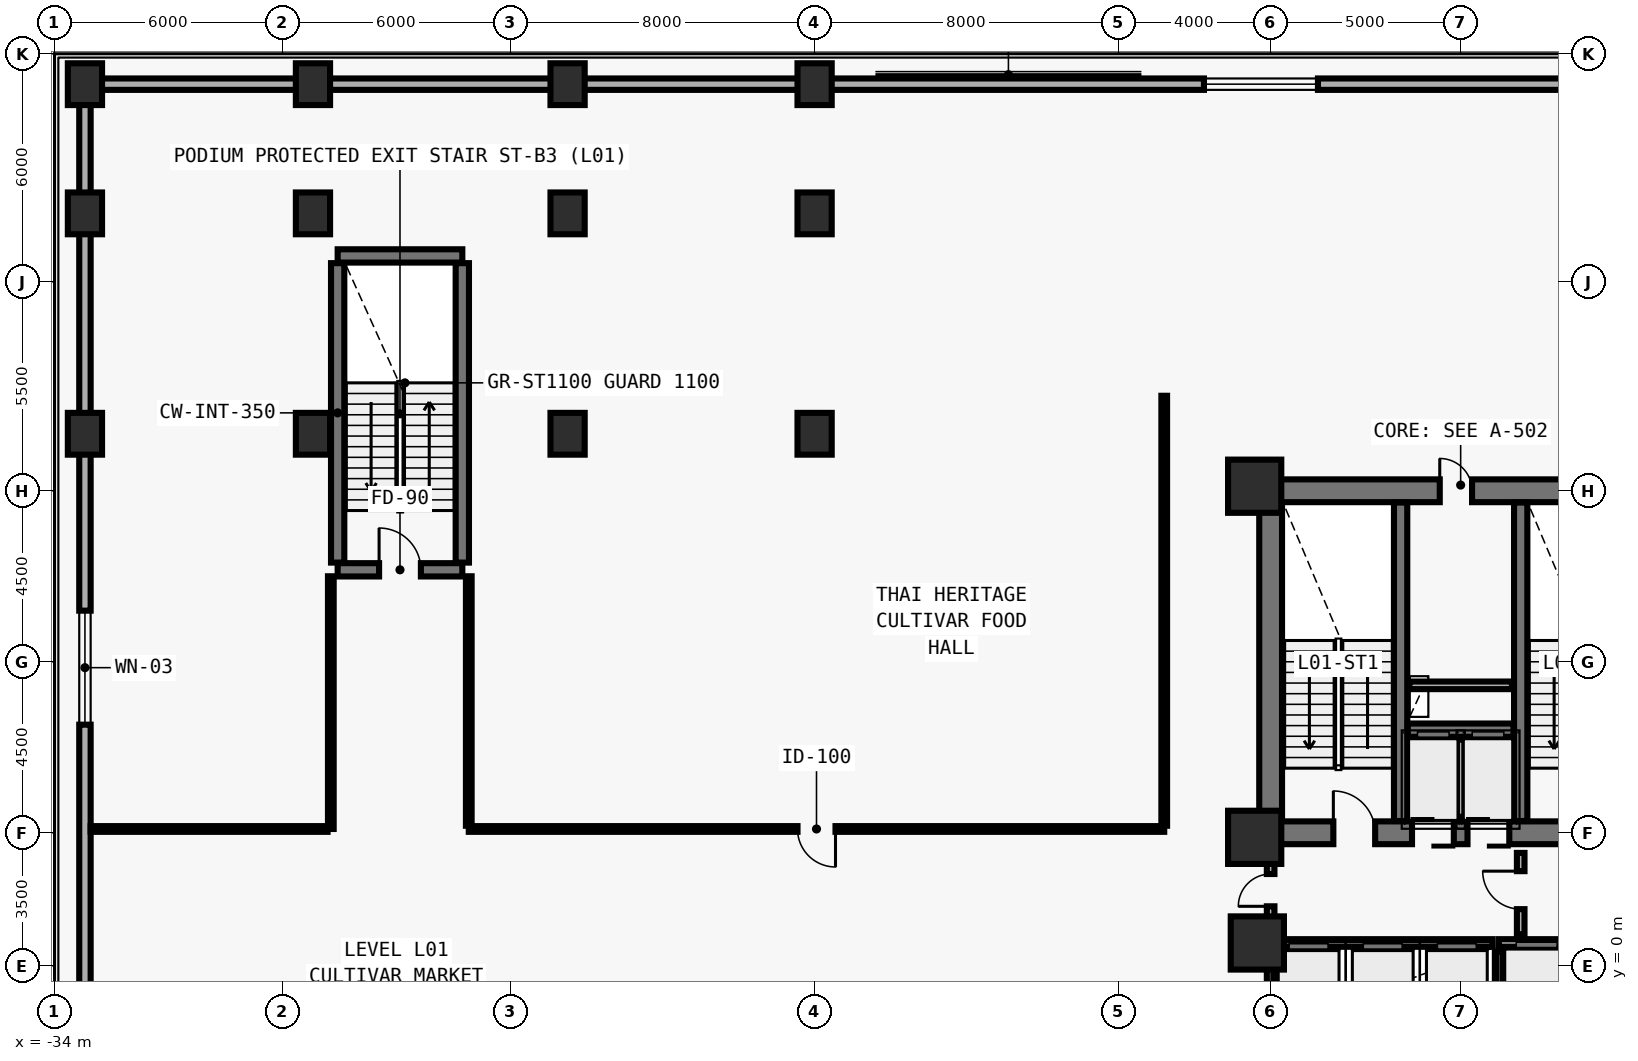
"""IFC4 building model, lengths in metres.
Left out: names, types, materials, properties, quantities, classifications, styles, units other than length and angle.
Written with IfcOpenShell. Run it as: python <this file> out.ifc"""

import sys

from ifc_helpers import new_model, si_unit, direction, frame, frame_2d, origin, origin_2d, place, context, subcontext, project, spatial, rectangle, extrude, element, fill, save


model = new_model("IFC4")
c1 = context("Model", 3, precision=1e-05, world=origin(), true_north=direction((0.0, 1.0)))
c2 = subcontext(c1, "Body", "Model", "MODEL_VIEW")
j1 = project(units=[si_unit("LENGTHUNIT", "METRE"), si_unit("PLANEANGLEUNIT", "RADIAN")], contexts=[c1])
p1 = place(None, origin())
s1 = spatial("IfcSite", under=j1, at=p1, CompositionType="ELEMENT")
p2 = place(p1, origin())
s2 = spatial("IfcBuilding", under=s1, at=p2, CompositionType="ELEMENT")
p3 = place(p2, frame((0.0, 0.0, 4.6)))
s3 = spatial("IfcBuildingStorey", under=s2, at=p3, CompositionType="ELEMENT", Elevation=4.6)
p4 = place(p3, frame((-26.55, 10.42, 0.0), z_axis=(0.0, 0.0, 1.0), x_axis=(1.0, 0.0, 0.0)))
e1 = element("IfcWall", 1, at=p4, inside=s3, PredefinedType="SHEAR", context=c2, shape_type="SweptSolid", body=[
    extrude(rectangle(XDim=3.28, YDim=0.35, at=frame_2d((1.64, 0.0))), origin(), (0.0, 0.0, 1.0), 4.592),
])
p5 = place(p4, frame((1.09, 0.0, 0.0)))
e2 = element("IfcOpeningElement", 2, at=p5, cuts=e1, PredefinedType="OPENING", context=c2, shape_type="SweptSolid", body=[
    extrude(rectangle(XDim=1.1, YDim=2.15, at=frame_2d((0.55, 1.075))), frame((0.0, 0.185, 0.0), z_axis=(0.0, -1.0, 0.0), x_axis=(1.0, 0.0, 0.0)), (0.0, 0.0, 1.0), 0.37),
])
p6 = place(p3, frame((-26.55, 18.68, 0.0), z_axis=(0.0, 0.0, 1.0), x_axis=(1.0, 0.0, 0.0)))
e3 = element("IfcWall", 3, at=p6, inside=s3, PredefinedType="SHEAR", context=c2, shape_type="SweptSolid", body=[
    extrude(rectangle(XDim=3.28, YDim=0.35, at=frame_2d((1.64, 0.0))), origin(), (0.0, 0.0, 1.0), 4.592),
])
for number, where, z_axis, x_axis in (
    (4, (-26.55, 10.61, 0.0), (0.0, 0.0, 1.0), (0.0, 1.0, 0.0)),
    (5, (-23.27, 10.61, 0.0), (0.0, 0.0, 1.0), (0.0, 1.0, 0.0)),
):
    element("IfcWall", number, at=place(p3, frame(where, z_axis=z_axis, x_axis=x_axis)), inside=s3, PredefinedType="SHEAR", context=c2, shape_type="SweptSolid", body=[
        extrude(rectangle(XDim=7.88, YDim=0.35, at=frame_2d((3.94, 0.0))), origin(), (0.0, 0.0, 1.0), 4.592),
    ])
p7 = place(p3, frame((-2.0, 3.5, 0.0), z_axis=(0.0, 0.0, 1.0), x_axis=(1.0, 0.0, 0.0)))
e6 = element("IfcWall", 6, at=p7, inside=s3, PredefinedType="SHEAR", context=c2, shape_type="SweptSolid", body=[
    extrude(rectangle(XDim=10.0, YDim=0.6, at=frame_2d((5.0, 0.0))), origin(), (0.0, 0.0, 1.0), 4.592),
])
p8 = place(p7, frame((1.65, 0.0, 0.0)))
e7 = element("IfcOpeningElement", 7, at=p8, cuts=e6, PredefinedType="OPENING", context=c2, shape_type="SweptSolid", body=[
    extrude(rectangle(XDim=1.1, YDim=2.15, at=frame_2d((0.55, 1.075))), frame((0.0, 0.31, 0.0), z_axis=(0.0, -1.0, 0.0), x_axis=(1.0, 0.0, 0.0)), (0.0, 0.0, 1.0), 0.62),
])
p9 = place(p7, frame((7.65, 0.0, 0.0)))
e8 = element("IfcOpeningElement", 8, at=p9, cuts=e6, PredefinedType="OPENING", context=c2, shape_type="SweptSolid", body=[
    extrude(rectangle(XDim=1.1, YDim=2.15, at=frame_2d((0.55, 1.075))), frame((0.0, 0.31, 0.0), z_axis=(0.0, -1.0, 0.0), x_axis=(1.0, 0.0, 0.0)), (0.0, 0.0, 1.0), 0.62),
])
p10 = place(p7, frame((3.72, 0.0, 0.0)))
e9 = element("IfcOpeningElement", 9, at=p10, cuts=e6, PredefinedType="OPENING", context=c2, shape_type="SweptSolid", body=[
    extrude(rectangle(XDim=1.1, YDim=2.2, at=frame_2d((0.55, 1.1))), frame((0.0, 0.31, 0.0), z_axis=(0.0, -1.0, 0.0), x_axis=(1.0, 0.0, 0.0)), (0.0, 0.0, 1.0), 0.62),
])
p11 = place(p7, frame((5.18, 0.0, 0.0)))
e10 = element("IfcOpeningElement", 10, at=p11, cuts=e6, PredefinedType="OPENING", context=c2, shape_type="SweptSolid", body=[
    extrude(rectangle(XDim=1.1, YDim=2.2, at=frame_2d((0.55, 1.1))), frame((0.0, 0.31, 0.0), z_axis=(0.0, -1.0, 0.0), x_axis=(1.0, 0.0, 0.0)), (0.0, 0.0, 1.0), 0.62),
])
p12 = place(p3, frame((-2.0, 12.5, 0.0), z_axis=(0.0, 0.0, 1.0), x_axis=(1.0, 0.0, 0.0)))
e11 = element("IfcWall", 11, at=p12, inside=s3, PredefinedType="SHEAR", context=c2, shape_type="SweptSolid", body=[
    extrude(rectangle(XDim=10.0, YDim=0.6, at=frame_2d((5.0, 0.0))), origin(), (0.0, 0.0, 1.0), 4.592),
])
p13 = place(p12, frame((4.45, 0.0, 0.0)))
e12 = element("IfcOpeningElement", 12, at=p13, cuts=e11, PredefinedType="OPENING", context=c2, shape_type="SweptSolid", body=[
    extrude(rectangle(XDim=0.85, YDim=2.1, at=frame_2d((0.425, 1.05))), frame((0.0, 0.31, 0.0), z_axis=(0.0, -1.0, 0.0), x_axis=(1.0, 0.0, 0.0)), (0.0, 0.0, 1.0), 0.62),
])
p14 = place(p3, frame((-2.0, 3.81, 0.0), z_axis=(0.0, 0.0, 1.0), x_axis=(0.0, 1.0, 0.0)))
e13 = element("IfcWall", 13, at=p14, inside=s3, PredefinedType="SHEAR", context=c2, shape_type="SweptSolid", body=[
    extrude(rectangle(XDim=8.38, YDim=0.6, at=frame_2d((4.19, 0.0))), origin(), (0.0, 0.0, 1.0), 4.592),
])
for number, where, z_axis, x_axis in (
    (14, (1.42, 3.81, 0.0), (0.0, 0.0, 1.0), (0.0, 1.0, 0.0)),
    (15, (4.58, 3.81, 0.0), (0.0, 0.0, 1.0), (0.0, 1.0, 0.0)),
):
    element("IfcWall", number, at=place(p3, frame(where, z_axis=z_axis, x_axis=x_axis)), inside=s3, PredefinedType="SHEAR", context=c2, shape_type="SweptSolid", body=[
        extrude(rectangle(XDim=8.38, YDim=0.35, at=frame_2d((4.19, 0.0))), origin(), (0.0, 0.0, 1.0), 4.592),
    ])
p15 = place(p3, frame((1.61, 6.2, 0.0), z_axis=(0.0, 0.0, 1.0), x_axis=(1.0, 0.0, 0.0)))
e16 = element("IfcWall", 16, at=p15, inside=s3, PredefinedType="SHEAR", context=c2, shape_type="SweptSolid", body=[
    extrude(rectangle(XDim=2.78, YDim=0.35, at=frame_2d((1.39, 0.0))), origin(), (0.0, 0.0, 1.0), 4.592),
])
for number, where, z_axis, x_axis in (
    (17, (-2.42, 12.62, 0.0), (0.0, 0.0, 1.0), (1.0, 0.0, 0.0)),
    (18, (-2.42, 3.38, 0.0), (0.0, 0.0, 1.0), (1.0, 0.0, 0.0)),
    (19, (-2.35, 0.6, 0.0), (0.0, 0.0, 1.0), (1.0, 0.0, 0.0)),
):
    element("IfcColumn", number, at=place(p3, frame(where, z_axis=z_axis, x_axis=x_axis)), inside=s3, PredefinedType="COLUMN", context=c2, shape_type="SweptSolid", body=[
        extrude(rectangle(XDim=1.4, YDim=1.4, at=origin_2d()), origin(), (0.0, 0.0, 1.0), 4.575),
    ])
for number, where, z_axis, x_axis in (
    (20, (-33.2, 14.0, 0.0), (0.0, 0.0, 1.0), (1.0, 0.0, 0.0)),
    (21, (-33.2, 19.8, 0.0), (0.0, 0.0, 1.0), (1.0, 0.0, 0.0)),
    (22, (-33.2, 23.2, 0.0), (0.0, 0.0, 1.0), (1.0, 0.0, 0.0)),
    (23, (-27.2, 14.0, 0.0), (0.0, 0.0, 1.0), (1.0, 0.0, 0.0)),
    (24, (-27.2, 19.8, 0.0), (0.0, 0.0, 1.0), (1.0, 0.0, 0.0)),
    (25, (-27.2, 23.2, 0.0), (0.0, 0.0, 1.0), (1.0, 0.0, 0.0)),
    (26, (-20.5, 14.0, 0.0), (0.0, 0.0, 1.0), (1.0, 0.0, 0.0)),
    (27, (-20.5, 19.8, 0.0), (0.0, 0.0, 1.0), (1.0, 0.0, 0.0)),
    (28, (-20.5, 23.2, 0.0), (0.0, 0.0, 1.0), (1.0, 0.0, 0.0)),
    (29, (-14.0, 14.0, 0.0), (0.0, 0.0, 1.0), (1.0, 0.0, 0.0)),
    (30, (-14.0, 19.8, 0.0), (0.0, 0.0, 1.0), (1.0, 0.0, 0.0)),
    (31, (-14.0, 23.2, 0.0), (0.0, 0.0, 1.0), (1.0, 0.0, 0.0)),
):
    element("IfcColumn", number, at=place(p3, frame(where, z_axis=z_axis, x_axis=x_axis)), inside=s3, PredefinedType="COLUMN", context=c2, shape_type="SweptSolid", body=[
        extrude(rectangle(XDim=0.9, YDim=1.1, at=origin_2d()), origin(), (0.0, 0.0, 1.0), 4.575),
    ])
p16 = place(p3, frame((-33.2, -22.655, 0.0), z_axis=(0.0, 0.0, 1.0), x_axis=(0.0, 1.0, 0.0)))
e32 = element("IfcWall", 32, at=p16, inside=s3, PredefinedType="SOLIDWALL", context=c2, shape_type="SweptSolid", body=[
    extrude(rectangle(XDim=45.31, YDim=0.3, at=frame_2d((22.655, 0.0))), origin(), (0.0, 0.0, 1.0), 3.35),
])
p17 = place(p16, frame((29.0, 0.0, 0.85)))
e33 = element("IfcOpeningElement", 33, at=p17, cuts=e32, PredefinedType="OPENING", context=c2, shape_type="SweptSolid", body=[
    extrude(rectangle(XDim=3.0, YDim=2.1, at=frame_2d((1.5, 1.05))), frame((0.0, 0.16, 0.0), z_axis=(0.0, -1.0, 0.0), x_axis=(1.0, 0.0, 0.0)), (0.0, 0.0, 1.0), 0.32),
])
p18 = place(p3, frame((-32.755, 23.2, 0.0), z_axis=(0.0, 0.0, 1.0), x_axis=(1.0, 0.0, 0.0)))
e34 = element("IfcWall", 34, at=p18, inside=s3, PredefinedType="SOLIDWALL", context=c2, shape_type="SweptSolid", body=[
    extrude(rectangle(XDim=65.51, YDim=0.3, at=frame_2d((32.755, 0.0))), origin(), (0.0, 0.0, 1.0), 3.35),
])
p19 = place(p18, frame((29.0, 0.0, 0.85)))
e35 = element("IfcOpeningElement", 35, at=p19, cuts=e34, PredefinedType="OPENING", context=c2, shape_type="SweptSolid", body=[
    extrude(rectangle(XDim=3.0, YDim=2.1, at=frame_2d((1.5, 1.05))), frame((0.0, 0.16, 0.0), z_axis=(0.0, -1.0, 0.0), x_axis=(1.0, 0.0, 0.0)), (0.0, 0.0, 1.0), 0.32),
])
p20 = place(p3, frame((3.0, 3.92, 0.0), z_axis=(0.0, 0.0, 1.0), x_axis=(0.0, 1.0, 0.0)))
e36 = element("IfcWall", 36, at=p20, inside=s3, PredefinedType="SOLIDWALL", context=c2, shape_type="SweptSolid", body=[
    extrude(rectangle(XDim=2.03, YDim=0.2, at=frame_2d((1.015, 0.0))), origin(), (0.0, 0.0, 1.0), 4.28),
])
p21 = place(p3, frame((1.65, 7.38, 0.0), z_axis=(0.0, 0.0, 1.0), x_axis=(1.0, 0.0, 0.0)))
e37 = element("IfcWall", 37, at=p21, inside=s3, PredefinedType="SOLIDWALL", context=c2, shape_type="SweptSolid", body=[
    extrude(rectangle(XDim=2.7, YDim=0.2, at=frame_2d((1.35, 0.0))), origin(), (0.0, 0.0, 1.0), 4.28),
])
p22 = place(p3, frame((4.0, 0.6, 0.0), z_axis=(0.0, 0.0, 1.0), x_axis=(1.0, 0.0, 0.0)))
e38 = element("IfcWall", 38, at=p22, inside=s3, PredefinedType="SOLIDWALL", context=c2, shape_type="SweptSolid", body=[
    extrude(rectangle(XDim=3.88, YDim=0.2, at=frame_2d((1.94, 0.0))), origin(), (0.0, 0.0, 1.0), 3.362),
])
p23 = place(p3, frame((-2.0, -1.57, 0.0), z_axis=(0.0, 0.0, 1.0), x_axis=(0.0, 1.0, 0.0)))
e39 = element("IfcWall", 39, at=p23, inside=s3, PredefinedType="SOLIDWALL", context=c2, shape_type="SweptSolid", body=[
    extrude(rectangle(XDim=2.05, YDim=0.2, at=frame_2d((1.025, 0.0))), origin(), (0.0, 0.0, 1.0), 3.362),
])
p24 = place(p3, frame((4.0, -1.57, 0.0), z_axis=(0.0, 0.0, 1.0), x_axis=(0.0, 1.0, 0.0)))
e40 = element("IfcWall", 40, at=p24, inside=s3, PredefinedType="SOLIDWALL", context=c2, shape_type="SweptSolid", body=[
    extrude(rectangle(XDim=1.94, YDim=0.2, at=frame_2d((0.97, 0.0))), origin(), (0.0, 0.0, 1.0), 4.28),
])
p25 = place(p3, frame((4.58, 0.83, 0.0), z_axis=(0.0, 0.0, 1.0), x_axis=(0.0, 1.0, 0.0)))
e41 = element("IfcWall", 41, at=p25, inside=s3, PredefinedType="MOVABLE", context=c2, shape_type="SweptSolid", body=[
    extrude(rectangle(XDim=2.14, YDim=0.2, at=frame_2d((1.07, 0.0))), origin(), (0.0, 0.0, 1.0), 4.28),
])
p26 = place(p25, frame((0.66, 0.0, 0.0)))
e42 = element("IfcOpeningElement", 42, at=p26, cuts=e41, PredefinedType="OPENING", context=c2, shape_type="SweptSolid", body=[
    extrude(rectangle(XDim=1.0, YDim=2.1, at=frame_2d((0.5, 1.05))), frame((0.0, 0.11, 0.0), z_axis=(0.0, -1.0, 0.0), x_axis=(1.0, 0.0, 0.0)), (0.0, 0.0, 1.0), 0.22),
])
p27 = place(p3, frame((-2.0, 0.72, 0.0), z_axis=(0.0, 0.0, 1.0), x_axis=(0.0, 1.0, 0.0)))
e43 = element("IfcWall", 43, at=p27, inside=s3, PredefinedType="MOVABLE", context=c2, shape_type="SweptSolid", body=[
    extrude(rectangle(XDim=2.25, YDim=0.2, at=frame_2d((1.125, 0.0))), origin(), (0.0, 0.0, 1.0), 3.512),
])
p28 = place(p27, frame((0.845, 0.0, 0.0)))
e44 = element("IfcOpeningElement", 44, at=p28, cuts=e43, PredefinedType="OPENING", context=c2, shape_type="SweptSolid", body=[
    extrude(rectangle(XDim=0.85, YDim=2.1, at=frame_2d((0.425, 1.05))), frame((0.0, 0.11, 0.0), z_axis=(0.0, -1.0, 0.0), x_axis=(1.0, 0.0, 0.0)), (0.0, 0.0, 1.0), 0.22),
])
p29 = place(p3, frame((-4.8, 3.6, 0.0), z_axis=(0.0, 0.0, 1.0), x_axis=(-1.0, 0.0, 0.0)))
e45 = element("IfcWall", 45, at=p29, inside=s3, PredefinedType="PARTITIONING", context=c2, shape_type="SweptSolid", body=[
    extrude(rectangle(XDim=18.3, YDim=0.15, at=frame_2d((9.15, 0.0))), origin(), (0.0, 0.0, 1.0), 4.28),
])
p30 = place(p29, frame((8.65, 0.0, 0.0)))
e46 = element("IfcOpeningElement", 46, at=p30, cuts=e45, PredefinedType="OPENING", context=c2, shape_type="SweptSolid", body=[
    extrude(rectangle(XDim=1.0, YDim=2.1, at=frame_2d((0.5, 1.05))), frame((0.0, 0.085, 0.0), z_axis=(0.0, -1.0, 0.0), x_axis=(1.0, 0.0, 0.0)), (0.0, 0.0, 1.0), 0.17),
])
p31 = place(p3, frame((-1.88, 0.6, 0.0), z_axis=(0.0, 0.0, 1.0), x_axis=(1.0, 0.0, 0.0)))
e47 = element("IfcWall", 47, at=p31, inside=s3, PredefinedType="MOVABLE", context=c2, shape_type="SweptSolid", body=[
    extrude(rectangle(XDim=5.72, YDim=0.2, at=frame_2d((2.86, 0.0))), origin(), (0.0, 0.0, 1.0), 3.362),
])
p32 = place(p3, frame((-4.8, 15.0, 0.0), z_axis=(0.0, 0.0, 1.0), x_axis=(0.0, -1.0, 0.0)))
e48 = element("IfcWall", 48, at=p32, inside=s3, PredefinedType="PARTITIONING", context=c2, shape_type="SweptSolid", body=[
    extrude(rectangle(XDim=11.315, YDim=0.15, at=frame_2d((5.657, 0.0))), origin(), (0.0, 0.0, 1.0), 4.28),
])
p33 = place(p3, frame((-23.1, 3.685, 0.0), z_axis=(0.0, 0.0, 1.0), x_axis=(0.0, 1.0, 0.0)))
e49 = element("IfcWall", 49, at=p33, inside=s3, PredefinedType="PARTITIONING", context=c2, shape_type="SweptSolid", body=[
    extrude(rectangle(XDim=6.565, YDim=0.15, at=frame_2d((3.282, 0.0))), origin(), (0.0, 0.0, 1.0), 4.28),
])
p34 = place(p3, frame((-26.73, 10.25, 0.0), z_axis=(0.0, 0.0, 1.0), x_axis=(0.0, -1.0, 0.0)))
e50 = element("IfcWall", 50, at=p34, inside=s3, PredefinedType="PARTITIONING", context=c2, shape_type="SweptSolid", body=[
    extrude(rectangle(XDim=6.65, YDim=0.15, at=frame_2d((3.325, 0.0))), origin(), (0.0, 0.0, 1.0), 4.28),
])
p35 = place(p3, frame((-26.815, 3.6, 0.0), z_axis=(0.0, 0.0, 1.0), x_axis=(-1.0, 0.0, 0.0)))
e51 = element("IfcWall", 51, at=p35, inside=s3, PredefinedType="PARTITIONING", context=c2, shape_type="SweptSolid", body=[
    extrude(rectangle(XDim=6.235, YDim=0.15, at=frame_2d((3.118, 0.0))), origin(), (0.0, 0.0, 1.0), 4.28),
])
p36 = place(p17, origin())
e52 = element("IfcWindow", 52, at=p36, inside=s3, PartitioningType="SINGLE_PANEL", PredefinedType="WINDOW", context=c2, shape_type="SweptSolid", body=[
    extrude(rectangle(XDim=3.0, YDim=2.1, at=frame_2d((1.5, 1.05))), frame((0.0, 0.03, 0.0), z_axis=(0.0, -1.0, 0.0), x_axis=(1.0, 0.0, 0.0)), (0.0, 0.0, 1.0), 0.06),
])
fill(e33, e52)
p37 = place(p19, origin())
e53 = element("IfcWindow", 53, at=p37, inside=s3, PartitioningType="SINGLE_PANEL", PredefinedType="WINDOW", context=c2, shape_type="SweptSolid", body=[
    extrude(rectangle(XDim=3.0, YDim=2.1, at=frame_2d((1.5, 1.05))), frame((0.0, 0.03, 0.0), z_axis=(0.0, -1.0, 0.0), x_axis=(1.0, 0.0, 0.0)), (0.0, 0.0, 1.0), 0.06),
])
fill(e35, e53)
p38 = place(p8, origin())
e54 = element("IfcDoor", 54, at=p38, inside=s3, OperationType="SINGLE_SWING_LEFT", PredefinedType="DOOR", context=c2, shape_type="SweptSolid", body=[
    extrude(rectangle(XDim=1.1, YDim=2.15, at=frame_2d((0.55, 1.075))), frame((0.0, 0.025, 0.0), z_axis=(0.0, -1.0, 0.0), x_axis=(1.0, 0.0, 0.0)), (0.0, 0.0, 1.0), 0.05),
])
fill(e7, e54)
p39 = place(p10, origin())
e55 = element("IfcDoor", 55, at=p39, inside=s3, OperationType="DOUBLE_DOOR_SLIDING", PredefinedType="DOOR", context=c2, shape_type="SweptSolid", body=[
    extrude(rectangle(XDim=1.1, YDim=2.2, at=frame_2d((0.55, 1.1))), frame((0.0, 0.025, 0.0), z_axis=(0.0, -1.0, 0.0), x_axis=(1.0, 0.0, 0.0)), (0.0, 0.0, 1.0), 0.05),
])
fill(e9, e55)
p40 = place(p11, origin())
e56 = element("IfcDoor", 56, at=p40, inside=s3, OperationType="DOUBLE_DOOR_SLIDING", PredefinedType="DOOR", context=c2, shape_type="SweptSolid", body=[
    extrude(rectangle(XDim=1.1, YDim=2.2, at=frame_2d((0.55, 1.1))), frame((0.0, 0.025, 0.0), z_axis=(0.0, -1.0, 0.0), x_axis=(1.0, 0.0, 0.0)), (0.0, 0.0, 1.0), 0.05),
])
fill(e10, e56)
p41 = place(p13, origin())
e57 = element("IfcDoor", 57, at=p41, inside=s3, OperationType="SINGLE_SWING_LEFT", PredefinedType="DOOR", context=c2, shape_type="SweptSolid", body=[
    extrude(rectangle(XDim=0.85, YDim=2.1, at=frame_2d((0.425, 1.05))), frame((0.0, 0.025, 0.0), z_axis=(0.0, -1.0, 0.0), x_axis=(1.0, 0.0, 0.0)), (0.0, 0.0, 1.0), 0.05),
])
fill(e12, e57)
p42 = place(p5, origin())
e58 = element("IfcDoor", 58, at=p42, inside=s3, OperationType="SINGLE_SWING_LEFT", PredefinedType="DOOR", context=c2, shape_type="SweptSolid", body=[
    extrude(rectangle(XDim=1.1, YDim=2.15, at=frame_2d((0.55, 1.075))), frame((0.0, 0.025, 0.0), z_axis=(0.0, -1.0, 0.0), x_axis=(1.0, 0.0, 0.0)), (0.0, 0.0, 1.0), 0.05),
])
fill(e2, e58)
p43 = place(p26, origin())
e59 = element("IfcDoor", 59, at=p43, inside=s3, OperationType="SINGLE_SWING_RIGHT", PredefinedType="DOOR", context=c2, shape_type="SweptSolid", body=[
    extrude(rectangle(XDim=1.0, YDim=2.1, at=frame_2d((0.5, 1.05))), frame((0.0, 0.025, 0.0), z_axis=(0.0, -1.0, 0.0), x_axis=(1.0, 0.0, 0.0)), (0.0, 0.0, 1.0), 0.05),
])
fill(e42, e59)
p44 = place(p28, origin())
e60 = element("IfcDoor", 60, at=p44, inside=s3, OperationType="SINGLE_SWING_LEFT", PredefinedType="DOOR", context=c2, shape_type="SweptSolid", body=[
    extrude(rectangle(XDim=0.85, YDim=2.1, at=frame_2d((0.425, 1.05))), frame((0.0, 0.025, 0.0), z_axis=(0.0, -1.0, 0.0), x_axis=(1.0, 0.0, 0.0)), (0.0, 0.0, 1.0), 0.05),
])
fill(e44, e60)
p45 = place(p30, origin())
e61 = element("IfcDoor", 61, at=p45, inside=s3, OperationType="SINGLE_SWING_LEFT", PredefinedType="DOOR", context=c2, shape_type="SweptSolid", body=[
    extrude(rectangle(XDim=1.0, YDim=2.1, at=frame_2d((0.5, 1.05))), frame((0.0, 0.025, 0.0), z_axis=(0.0, -1.0, 0.0), x_axis=(1.0, 0.0, 0.0)), (0.0, 0.0, 1.0), 0.05),
])
fill(e46, e61)
save(model, sys.argv[1])
